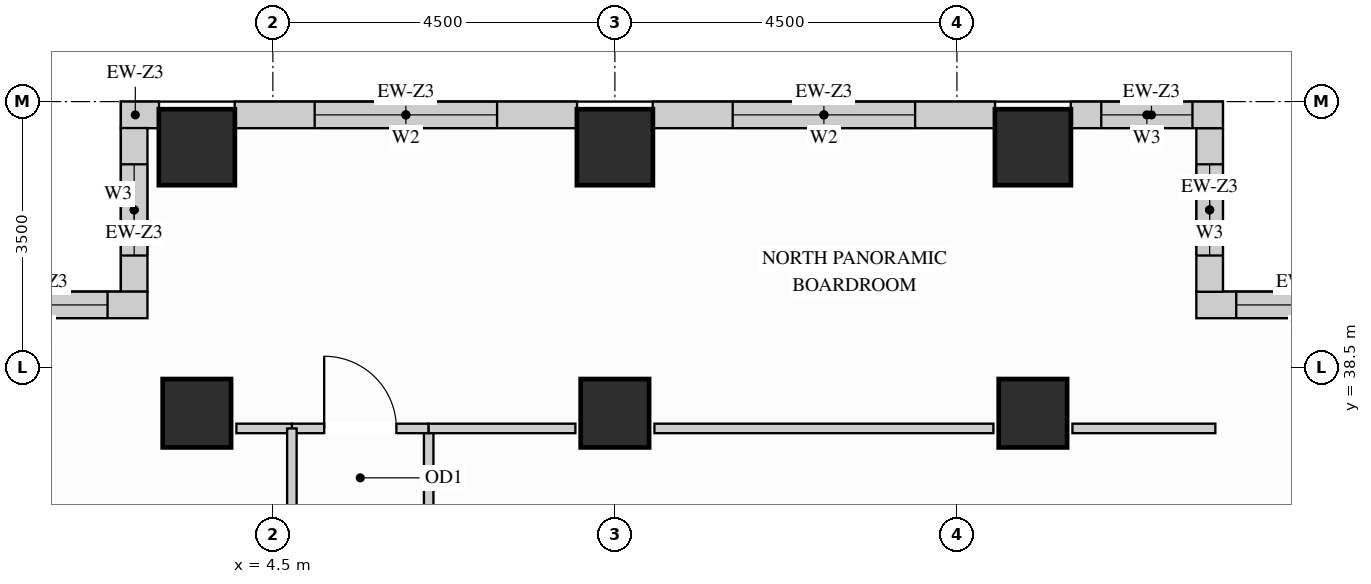
"""IFC4 building model, lengths in metres.
Left out: names, types, materials, properties, quantities, classifications, styles, units other than length and angle.
Written with IfcOpenShell. Run it as: python <this file> out.ifc"""

import sys

from ifc_helpers import new_model, si_unit, direction, frame, frame_2d, origin, origin_2d, place, context, subcontext, project, spatial, rectangle, extrude, source, transform, mapped, element, fill, save


model = new_model("IFC4")
c1 = context("Model", 3, precision=1e-05, world=origin(), true_north=direction((0.0, 1.0)))
c2 = subcontext(c1, "Body", "Model", "MODEL_VIEW")
j1 = project(units=[si_unit("LENGTHUNIT", "METRE"), si_unit("PLANEANGLEUNIT", "RADIAN")], contexts=[c1])
p1 = place(None, origin())
s1 = spatial("IfcSite", under=j1, at=p1, CompositionType="ELEMENT")
p2 = place(p1, origin())
s2 = spatial("IfcBuilding", under=s1, at=p2, CompositionType="ELEMENT")
p3 = place(p2, frame((0.0, 0.0, 189.9)))
s3 = spatial("IfcBuildingStorey", under=s2, at=p3, CompositionType="ELEMENT", Elevation=189.9)
m1 = source(origin(), c2, "Body", "SweptSolid", [
    extrude(rectangle(XDim=0.9, YDim=0.9, at=origin_2d()), origin(), (0.0, 0.0, 1.0), 3.4),
])
for number, where, z_axis, x_axis in (
    (1, (14.5, 37.9, 0.0), (0.0, 0.0, 1.0), (1.0, 0.0, 0.0)),
    (2, (3.5, 37.9, 0.0), (0.0, 0.0, 1.0), (1.0, 0.0, 0.0)),
    (3, (9.0, 37.9, 0.0), (0.0, 0.0, 1.0), (1.0, 0.0, 0.0)),
):
    element("IfcColumn", number, at=place(p3, frame(where, z_axis=z_axis, x_axis=x_axis)), inside=s3, PredefinedType="COLUMN", context=c2, shape_type="MappedRepresentation", body=[
        mapped(m1, transform((0.0, 0.0, 0.0), x_axis=(1.0, 0.0, 0.0), y_axis=(0.0, 1.0, 0.0), z_axis=(0.0, 0.0, 1.0))),
    ])
m2 = source(origin(), c2, "Body", "SweptSolid", [
    extrude(rectangle(XDim=1.0, YDim=1.0, at=origin_2d()), origin(), (0.0, 0.0, 1.0), 3.4),
])
for number, where, z_axis, x_axis in (
    (4, (14.5, 41.4, 0.0), (0.0, 0.0, 1.0), (1.0, 0.0, 0.0)),
    (5, (3.5, 41.4, 0.0), (0.0, 0.0, 1.0), (1.0, 0.0, 0.0)),
    (6, (9.0, 41.4, 0.0), (0.0, 0.0, 1.0), (1.0, 0.0, 0.0)),
):
    element("IfcColumn", number, at=place(p3, frame(where, z_axis=z_axis, x_axis=x_axis)), inside=s3, PredefinedType="COLUMN", context=c2, shape_type="MappedRepresentation", body=[
        mapped(m2, transform((0.0, 0.0, 0.0), x_axis=(1.0, 0.0, 0.0), y_axis=(0.0, 1.0, 0.0), z_axis=(0.0, 0.0, 1.0))),
    ])
p4 = place(p3, frame((19.5, 39.325, 0.0), z_axis=(0.0, 0.0, 1.0), x_axis=(-1.0, 0.0, 0.0)))
e7 = element("IfcWall", 7, at=p4, inside=s3, PredefinedType="SOLIDWALL", context=c2, shape_type="SweptSolid", body=[
    extrude(rectangle(XDim=2.85, YDim=0.35, at=frame_2d((1.425, 0.0))), origin(), (0.0, 0.0, 1.0), 3.385),
])
p5 = place(p4, frame((0.525, 0.0, 0.78)))
e8 = element("IfcOpeningElement", 8, at=p5, cuts=e7, PredefinedType="OPENING", context=c2, shape_type="SweptSolid", body=[
    extrude(rectangle(XDim=1.8, YDim=2.1, at=frame_2d((0.9, 1.05))), frame((0.0, 0.185, 0.0), z_axis=(0.0, -1.0, 0.0), x_axis=(1.0, 0.0, 0.0)), (0.0, 0.0, 1.0), 0.37),
])
p6 = place(p3, frame((16.825, 39.498, 0.0), z_axis=(0.0, 0.0, 1.0), x_axis=(0.0, 1.0, 0.0)))
e9 = element("IfcWall", 9, at=p6, inside=s3, PredefinedType="SOLIDWALL", context=c2, shape_type="SweptSolid", body=[
    extrude(rectangle(XDim=2.154, YDim=0.35, at=frame_2d((1.077, 0.0))), origin(), (0.0, 0.0, 1.0), 3.385),
])
p7 = place(p6, frame((0.477, 0.0, 0.78)))
e10 = element("IfcOpeningElement", 10, at=p7, cuts=e9, PredefinedType="OPENING", context=c2, shape_type="SweptSolid", body=[
    extrude(rectangle(XDim=1.2, YDim=2.1, at=frame_2d((0.6, 1.05))), frame((0.0, 0.185, 0.0), z_axis=(0.0, -1.0, 0.0), x_axis=(1.0, 0.0, 0.0)), (0.0, 0.0, 1.0), 0.37),
])
p8 = place(p3, frame((17.0, 41.825, 0.0), z_axis=(0.0, 0.0, 1.0), x_axis=(-1.0, 0.0, 0.0)))
e11 = element("IfcWall", 11, at=p8, inside=s3, PredefinedType="SOLIDWALL", context=c2, shape_type="SweptSolid", body=[
    extrude(rectangle(XDim=2.002, YDim=0.35, at=frame_2d((1.001, 0.0))), origin(), (0.0, 0.0, 1.0), 3.385),
])
p9 = place(p8, frame((0.401, 0.0, 0.78)))
e12 = element("IfcOpeningElement", 12, at=p9, cuts=e11, PredefinedType="OPENING", context=c2, shape_type="SweptSolid", body=[
    extrude(rectangle(XDim=1.2, YDim=2.1, at=frame_2d((0.6, 1.05))), frame((0.0, 0.185, 0.0), z_axis=(0.0, -1.0, 0.0), x_axis=(1.0, 0.0, 0.0)), (0.0, 0.0, 1.0), 0.37),
])
p10 = place(p3, frame((14.002, 41.825, 0.0), z_axis=(0.0, 0.0, 1.0), x_axis=(-1.0, 0.0, 0.0)))
e13 = element("IfcWall", 13, at=p10, inside=s3, PredefinedType="SOLIDWALL", context=c2, shape_type="SweptSolid", body=[
    extrude(rectangle(XDim=4.504, YDim=0.35, at=frame_2d((2.252, 0.0))), origin(), (0.0, 0.0, 1.0), 2.612),
])
p11 = place(p10, frame((1.052, 0.0, 0.78)))
e14 = element("IfcOpeningElement", 14, at=p11, cuts=e13, PredefinedType="OPENING", context=c2, shape_type="SweptSolid", body=[
    extrude(rectangle(XDim=2.4, YDim=1.652, at=frame_2d((1.2, 0.826))), frame((0.0, 0.185, 0.0), z_axis=(0.0, -1.0, 0.0), x_axis=(1.0, 0.0, 0.0)), (0.0, 0.0, 1.0), 0.37),
])
p12 = place(p3, frame((8.502, 41.825, 0.0), z_axis=(0.0, 0.0, 1.0), x_axis=(-1.0, 0.0, 0.0)))
e15 = element("IfcWall", 15, at=p12, inside=s3, PredefinedType="SOLIDWALL", context=c2, shape_type="SweptSolid", body=[
    extrude(rectangle(XDim=4.504, YDim=0.35, at=frame_2d((2.252, 0.0))), origin(), (0.0, 0.0, 1.0), 2.612),
])
p13 = place(p12, frame((1.052, 0.0, 0.78)))
e16 = element("IfcOpeningElement", 16, at=p13, cuts=e15, PredefinedType="OPENING", context=c2, shape_type="SweptSolid", body=[
    extrude(rectangle(XDim=2.4, YDim=1.652, at=frame_2d((1.2, 0.826))), frame((0.0, 0.185, 0.0), z_axis=(0.0, -1.0, 0.0), x_axis=(1.0, 0.0, 0.0)), (0.0, 0.0, 1.0), 0.37),
])
m3 = source(origin(), c2, "Body", "SweptSolid", [
    extrude(rectangle(XDim=0.502, YDim=0.35, at=frame_2d((0.251, 0.0))), origin(), (0.0, 0.0, 1.0), 3.385),
])
p14 = place(p3, frame((3.002, 41.825, 0.0), z_axis=(0.0, 0.0, 1.0), x_axis=(-1.0, 0.0, 0.0)))
e17 = element("IfcWall", 17, at=p14, inside=s3, PredefinedType="SOLIDWALL", context=c2, shape_type="MappedRepresentation", body=[
    mapped(m3, transform((0.0, 0.0, 0.0), x_axis=(1.0, 0.0, 0.0), y_axis=(0.0, 1.0, 0.0), z_axis=(0.0, 0.0, 1.0))),
])
p15 = place(p3, frame((2.675, 41.652, 0.0), z_axis=(0.0, 0.0, 1.0), x_axis=(0.0, -1.0, 0.0)))
e18 = element("IfcWall", 18, at=p15, inside=s3, PredefinedType="SOLIDWALL", context=c2, shape_type="SweptSolid", body=[
    extrude(rectangle(XDim=2.154, YDim=0.35, at=frame_2d((1.077, 0.0))), origin(), (0.0, 0.0, 1.0), 3.385),
])
p16 = place(p15, frame((0.477, 0.0, 0.78)))
e19 = element("IfcOpeningElement", 19, at=p16, cuts=e18, PredefinedType="OPENING", context=c2, shape_type="SweptSolid", body=[
    extrude(rectangle(XDim=1.2, YDim=2.1, at=frame_2d((0.6, 1.05))), frame((0.0, 0.185, 0.0), z_axis=(0.0, -1.0, 0.0), x_axis=(1.0, 0.0, 0.0)), (0.0, 0.0, 1.0), 0.37),
])
p17 = place(p3, frame((2.85, 39.325, 0.0), z_axis=(0.0, 0.0, 1.0), x_axis=(-1.0, 0.0, 0.0)))
e20 = element("IfcWall", 20, at=p17, inside=s3, PredefinedType="SOLIDWALL", context=c2, shape_type="SweptSolid", body=[
    extrude(rectangle(XDim=2.85, YDim=0.35, at=frame_2d((1.425, 0.0))), origin(), (0.0, 0.0, 1.0), 3.385),
])
p18 = place(p17, frame((0.525, 0.0, 0.78)))
e21 = element("IfcOpeningElement", 21, at=p18, cuts=e20, PredefinedType="OPENING", context=c2, shape_type="SweptSolid", body=[
    extrude(rectangle(XDim=1.8, YDim=2.1, at=frame_2d((0.9, 1.05))), frame((0.0, 0.185, 0.0), z_axis=(0.0, -1.0, 0.0), x_axis=(1.0, 0.0, 0.0)), (0.0, 0.0, 1.0), 0.37),
])
p19 = place(p3, frame((6.55, 34.625, 0.0), z_axis=(0.0, 0.0, 1.0), x_axis=(0.0, 1.0, 0.0)))
e22 = element("IfcWall", 22, at=p19, inside=s3, PredefinedType="PARTITIONING", context=c2, shape_type="SweptSolid", body=[
    extrude(rectangle(XDim=3.075, YDim=0.125, at=frame_2d((1.538, 0.0))), origin(), (0.0, 0.0, 1.0), 3.385),
])
p20 = place(p19, frame((1.062, 0.0, 0.0)))
e23 = element("IfcOpeningElement", 23, at=p20, cuts=e22, PredefinedType="OPENING", context=c2, shape_type="SweptSolid", body=[
    extrude(rectangle(XDim=0.95, YDim=2.15, at=frame_2d((0.475, 1.075))), frame((0.0, 0.073, 0.0), z_axis=(0.0, -1.0, 0.0), x_axis=(1.0, 0.0, 0.0)), (0.0, 0.0, 1.0), 0.145),
])
p21 = place(p3, frame((4.75, 37.7, 0.0), z_axis=(0.0, 0.0, 1.0), x_axis=(1.0, 0.0, 0.0)))
e24 = element("IfcWall", 24, at=p21, inside=s3, PredefinedType="PARTITIONING", context=c2, shape_type="SweptSolid", body=[
    extrude(rectangle(XDim=1.8, YDim=0.125, at=frame_2d((0.9, 0.0))), origin(), (0.0, 0.0, 1.0), 2.773),
])
p22 = place(p21, frame((0.425, 0.0, 0.0)))
e25 = element("IfcOpeningElement", 25, at=p22, cuts=e24, PredefinedType="OPENING", context=c2, shape_type="SweptSolid", body=[
    extrude(rectangle(XDim=0.95, YDim=2.15, at=frame_2d((0.475, 1.075))), frame((0.0, 0.073, 0.0), z_axis=(0.0, -1.0, 0.0), x_axis=(1.0, 0.0, 0.0)), (0.0, 0.0, 1.0), 0.145),
])
m4 = source(origin(), c2, "Body", "SweptSolid", [
    extrude(rectangle(XDim=1.93, YDim=0.125, at=frame_2d((0.965, 0.0))), origin(), (0.0, 0.0, 1.0), 2.773),
])
p23 = place(p3, frame((6.55, 37.7, 0.0), z_axis=(0.0, 0.0, 1.0), x_axis=(1.0, 0.0, 0.0)))
e26 = element("IfcWall", 26, at=p23, inside=s3, PredefinedType="PARTITIONING", context=c2, shape_type="MappedRepresentation", body=[
    mapped(m4, transform((0.0, 0.0, 0.0), x_axis=(1.0, 0.0, 0.0), y_axis=(0.0, 1.0, 0.0), z_axis=(0.0, 0.0, 1.0))),
])
m5 = source(origin(), c2, "Body", "SweptSolid", [
    extrude(rectangle(XDim=4.46, YDim=0.125, at=frame_2d((2.23, 0.0))), origin(), (0.0, 0.0, 1.0), 2.773),
])
p24 = place(p3, frame((9.52, 37.7, 0.0), z_axis=(0.0, 0.0, 1.0), x_axis=(1.0, 0.0, 0.0)))
e27 = element("IfcWall", 27, at=p24, inside=s3, PredefinedType="PARTITIONING", context=c2, shape_type="MappedRepresentation", body=[
    mapped(m5, transform((0.0, 0.0, 0.0), x_axis=(1.0, 0.0, 0.0), y_axis=(0.0, 1.0, 0.0), z_axis=(0.0, 0.0, 1.0))),
])
m6 = source(origin(), c2, "Body", "SweptSolid", [
    extrude(rectangle(XDim=1.88, YDim=0.125, at=frame_2d((0.94, 0.0))), origin(), (0.0, 0.0, 1.0), 2.773),
])
p25 = place(p3, frame((15.02, 37.7, 0.0), z_axis=(0.0, 0.0, 1.0), x_axis=(1.0, 0.0, 0.0)))
e28 = element("IfcWall", 28, at=p25, inside=s3, PredefinedType="PARTITIONING", context=c2, shape_type="MappedRepresentation", body=[
    mapped(m6, transform((0.0, 0.0, 0.0), x_axis=(1.0, 0.0, 0.0), y_axis=(0.0, 1.0, 0.0), z_axis=(0.0, 0.0, 1.0))),
])
m7 = source(origin(), c2, "Body", "SweptSolid", [
    extrude(rectangle(XDim=0.73, YDim=0.125, at=frame_2d((0.365, 0.0))), origin(), (0.0, 0.0, 1.0), 2.773),
])
p26 = place(p3, frame((4.02, 37.7, 0.0), z_axis=(0.0, 0.0, 1.0), x_axis=(1.0, 0.0, 0.0)))
e29 = element("IfcWall", 29, at=p26, inside=s3, PredefinedType="PARTITIONING", context=c2, shape_type="MappedRepresentation", body=[
    mapped(m7, transform((0.0, 0.0, 0.0), x_axis=(1.0, 0.0, 0.0), y_axis=(0.0, 1.0, 0.0), z_axis=(0.0, 0.0, 1.0))),
])
p27 = place(p3, frame((4.75, 34.625, 0.0), z_axis=(0.0, 0.0, 1.0), x_axis=(0.0, 1.0, 0.0)))
e30 = element("IfcWall", 30, at=p27, inside=s3, PredefinedType="PARTITIONING", context=c2, shape_type="SweptSolid", body=[
    extrude(rectangle(XDim=3.075, YDim=0.125, at=frame_2d((1.538, 0.0))), origin(), (0.0, 0.0, 1.0), 3.385),
])
p28 = place(p27, frame((1.062, 0.0, 0.0)))
e31 = element("IfcOpeningElement", 31, at=p28, cuts=e30, PredefinedType="OPENING", context=c2, shape_type="SweptSolid", body=[
    extrude(rectangle(XDim=0.95, YDim=2.15, at=frame_2d((0.475, 1.075))), frame((0.0, 0.073, 0.0), z_axis=(0.0, -1.0, 0.0), x_axis=(1.0, 0.0, 0.0)), (0.0, 0.0, 1.0), 0.145),
])
m8 = source(origin(), c2, "Body", "SweptSolid", [
    extrude(rectangle(XDim=0.95, YDim=2.15, at=frame_2d((0.475, 1.075))), frame((0.0, 0.025, 0.0), z_axis=(0.0, -1.0, 0.0), x_axis=(1.0, 0.0, 0.0)), (0.0, 0.0, 1.0), 0.05),
])
p29 = place(p22, origin())
e32 = element("IfcDoor", 32, at=p29, inside=s3, OperationType="SINGLE_SWING_LEFT", PredefinedType="DOOR", context=c2, shape_type="MappedRepresentation", body=[
    mapped(m8, transform((0.0, 0.0, 0.0), x_axis=(1.0, 0.0, 0.0), y_axis=(0.0, 1.0, 0.0), z_axis=(0.0, 0.0, 1.0))),
])
fill(e25, e32)
m9 = source(origin(), c2, "Body", "SweptSolid", [
    extrude(rectangle(XDim=1.8, YDim=2.1, at=frame_2d((0.9, 1.05))), frame((0.0, 0.03, 0.0), z_axis=(0.0, -1.0, 0.0), x_axis=(1.0, 0.0, 0.0)), (0.0, 0.0, 1.0), 0.06),
])
p30 = place(p5, origin())
e33 = element("IfcWindow", 33, at=p30, inside=s3, PartitioningType="SINGLE_PANEL", PredefinedType="WINDOW", context=c2, shape_type="MappedRepresentation", body=[
    mapped(m9, transform((0.0, 0.0, 0.0), x_axis=(1.0, 0.0, 0.0), y_axis=(0.0, 1.0, 0.0), z_axis=(0.0, 0.0, 1.0))),
])
fill(e8, e33)
p31 = place(p18, origin())
e34 = element("IfcWindow", 34, at=p31, inside=s3, PartitioningType="SINGLE_PANEL", PredefinedType="WINDOW", context=c2, shape_type="MappedRepresentation", body=[
    mapped(m9, transform((0.0, 0.0, 0.0), x_axis=(1.0, 0.0, 0.0), y_axis=(0.0, 1.0, 0.0), z_axis=(0.0, 0.0, 1.0))),
])
fill(e21, e34)
m10 = source(origin(), c2, "Body", "SweptSolid", [
    extrude(rectangle(XDim=2.4, YDim=1.652, at=frame_2d((1.2, 0.826))), frame((0.0, 0.03, 0.0), z_axis=(0.0, -1.0, 0.0), x_axis=(1.0, 0.0, 0.0)), (0.0, 0.0, 1.0), 0.06),
])
p32 = place(p11, origin())
e35 = element("IfcWindow", 35, at=p32, inside=s3, PartitioningType="SINGLE_PANEL", PredefinedType="WINDOW", context=c2, shape_type="MappedRepresentation", body=[
    mapped(m10, transform((0.0, 0.0, 0.0), x_axis=(1.0, 0.0, 0.0), y_axis=(0.0, 1.0, 0.0), z_axis=(0.0, 0.0, 1.0))),
])
fill(e14, e35)
p33 = place(p13, origin())
e36 = element("IfcWindow", 36, at=p33, inside=s3, PartitioningType="SINGLE_PANEL", PredefinedType="WINDOW", context=c2, shape_type="MappedRepresentation", body=[
    mapped(m10, transform((0.0, 0.0, 0.0), x_axis=(1.0, 0.0, 0.0), y_axis=(0.0, 1.0, 0.0), z_axis=(0.0, 0.0, 1.0))),
])
fill(e16, e36)
m11 = source(origin(), c2, "Body", "SweptSolid", [
    extrude(rectangle(XDim=1.2, YDim=2.1, at=frame_2d((0.6, 1.05))), frame((0.0, 0.03, 0.0), z_axis=(0.0, -1.0, 0.0), x_axis=(1.0, 0.0, 0.0)), (0.0, 0.0, 1.0), 0.06),
])
p34 = place(p7, origin())
e37 = element("IfcWindow", 37, at=p34, inside=s3, PartitioningType="SINGLE_PANEL", PredefinedType="WINDOW", context=c2, shape_type="MappedRepresentation", body=[
    mapped(m11, transform((0.0, 0.0, 0.0), x_axis=(1.0, 0.0, 0.0), y_axis=(0.0, 1.0, 0.0), z_axis=(0.0, 0.0, 1.0))),
])
fill(e10, e37)
p35 = place(p9, origin())
e38 = element("IfcWindow", 38, at=p35, inside=s3, PartitioningType="SINGLE_PANEL", PredefinedType="WINDOW", context=c2, shape_type="MappedRepresentation", body=[
    mapped(m11, transform((0.0, 0.0, 0.0), x_axis=(1.0, 0.0, 0.0), y_axis=(0.0, 1.0, 0.0), z_axis=(0.0, 0.0, 1.0))),
])
fill(e12, e38)
p36 = place(p16, origin())
e39 = element("IfcWindow", 39, at=p36, inside=s3, PartitioningType="SINGLE_PANEL", PredefinedType="WINDOW", context=c2, shape_type="MappedRepresentation", body=[
    mapped(m11, transform((0.0, 0.0, 0.0), x_axis=(1.0, 0.0, 0.0), y_axis=(0.0, 1.0, 0.0), z_axis=(0.0, 0.0, 1.0))),
])
fill(e19, e39)
save(model, sys.argv[1])
